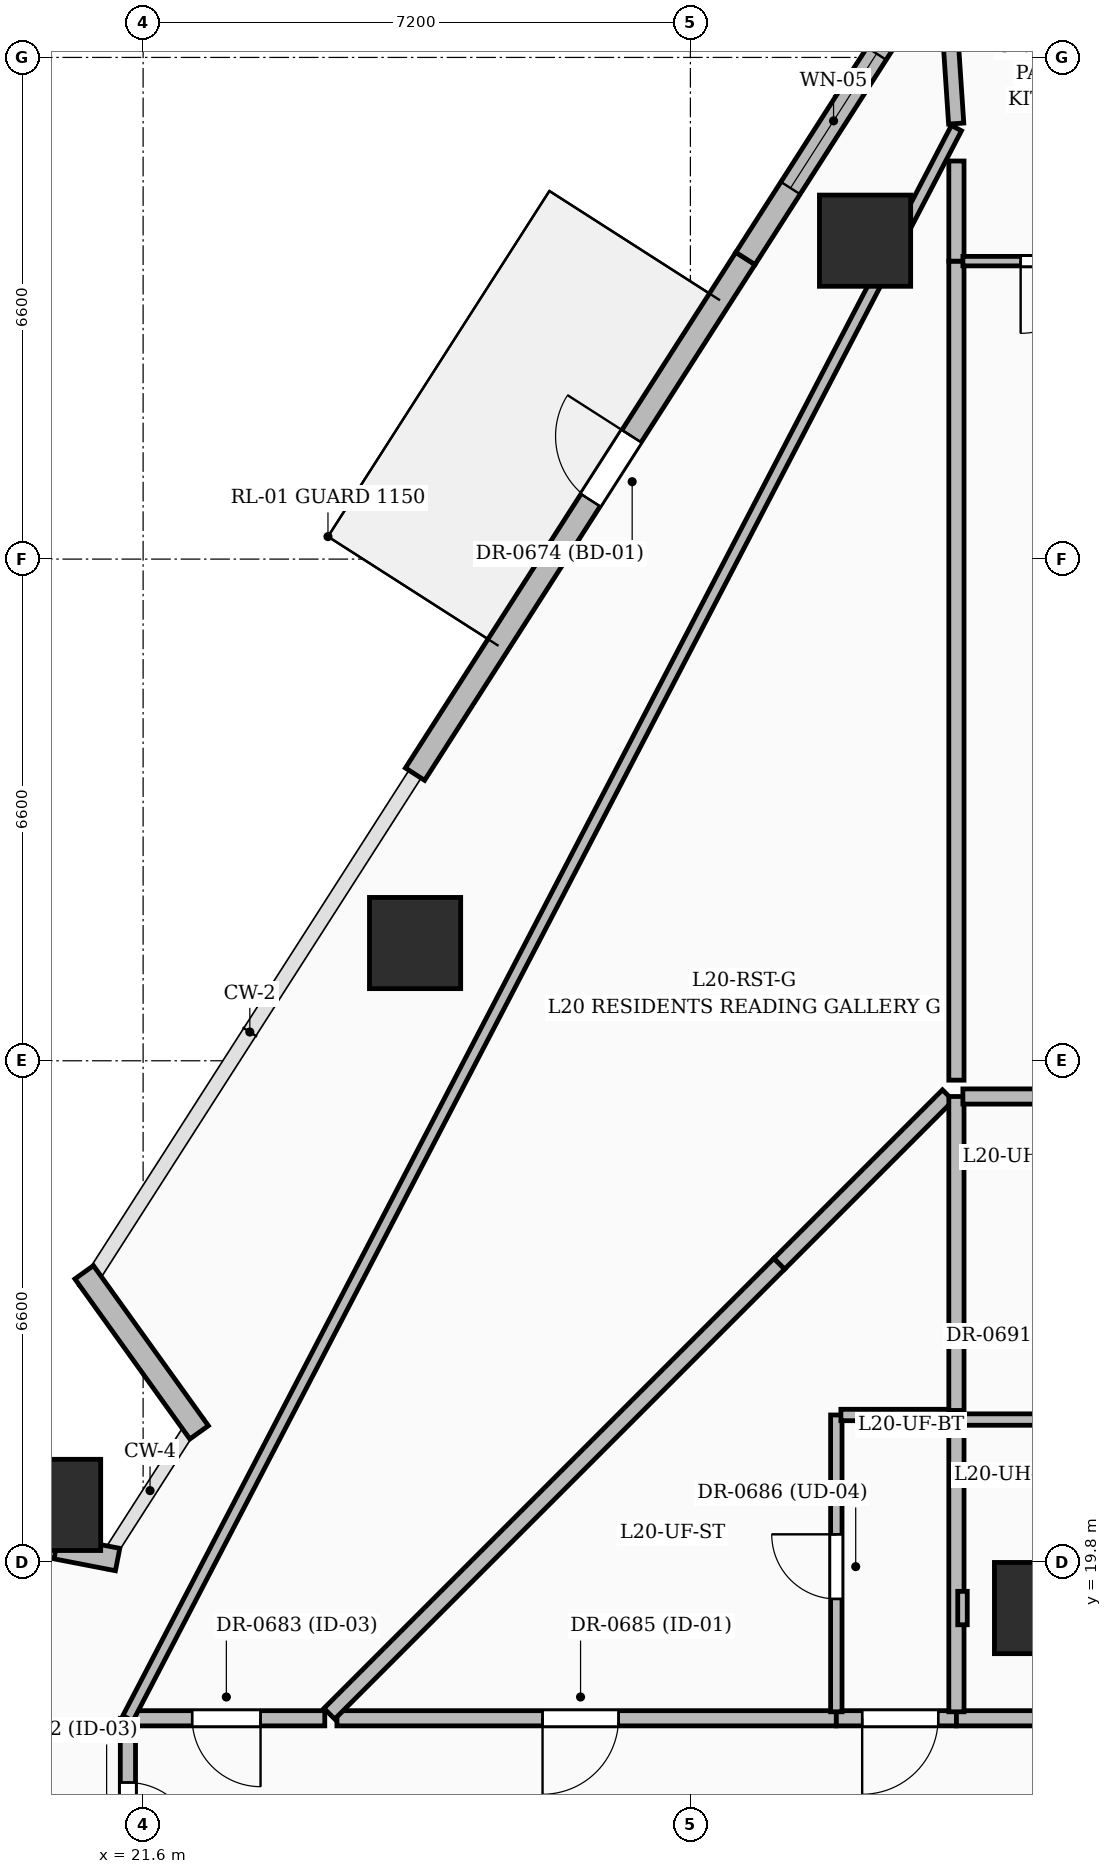
"""IFC4 building model, lengths in metres.
Left out: names, types, materials, properties, quantities, classifications, styles, units other than length and angle.
Written with IfcOpenShell. Run it as: python <this file> out.ifc"""

import sys

from ifc_helpers import new_model, si_unit, direction, frame, frame_2d, origin, origin_2d, place, context, subcontext, project, spatial, rectangle, extrude, element, fill, save


model = new_model("IFC4")
c1 = context("Model", 3, precision=1e-05, world=origin(), true_north=direction((0.0, 1.0)))
c2 = subcontext(c1, "Body", "Model", "MODEL_VIEW")
j1 = project(units=[si_unit("LENGTHUNIT", "METRE"), si_unit("PLANEANGLEUNIT", "RADIAN")], contexts=[c1])
p1 = place(None, origin())
s1 = spatial("IfcSite", under=j1, at=p1, CompositionType="ELEMENT")
p2 = place(p1, origin())
s2 = spatial("IfcBuilding", under=s1, at=p2, CompositionType="ELEMENT")
p3 = place(p2, frame((0.0, 0.0, 82.2)))
s3 = spatial("IfcBuildingStorey", under=s2, at=p3, CompositionType="ELEMENT", Elevation=82.2)
for number, where, z_axis, x_axis in (
    (1, (33.4, 19.2, 0.0), (0.0, 0.0, 1.0), (1.0, 0.0, 0.0)),
    (2, (31.098, 37.189, 0.0), (0.0, 0.0, 1.0), (1.0, 0.0, 0.0)),
    (3, (25.178, 27.949, 0.0), (0.0, 0.0, 1.0), (1.0, 0.0, 0.0)),
    (4, (20.442, 20.557, 0.0), (0.0, 0.0, 1.0), (1.0, 0.0, 0.0)),
):
    element("IfcColumn", number, at=place(p3, frame(where, z_axis=z_axis, x_axis=x_axis)), inside=s3, PredefinedType="COLUMN", context=c2, shape_type="SweptSolid", body=[
        extrude(rectangle(XDim=1.2, YDim=1.2, at=origin_2d()), origin(), (0.0, 0.0, 1.0), 3.6),
    ])
p4 = place(p3, frame((20.456, 19.995, 0.0), z_axis=(0.0, 0.0, 1.0), x_axis=(0.981715557517, -0.190353786749, 0.0)))
e5 = element("IfcWall", 5, at=p4, inside=s3, PredefinedType="SOLIDWALL", context=c2, shape_type="SweptSolid", body=[
    extrude(rectangle(XDim=0.823, YDim=0.3, at=frame_2d((0.412, 0.0))), origin(), (0.0, 0.0, 1.0), 2.35),
])
p5 = place(p3, frame((22.337, 21.511, 0.0), z_axis=(0.0, 0.0, 1.0), x_axis=(-0.583178108206, 0.812344319922, 0.0)))
e6 = element("IfcWall", 6, at=p5, inside=s3, PredefinedType="SOLIDWALL", context=c2, shape_type="SweptSolid", body=[
    extrude(rectangle(XDim=2.593, YDim=0.3, at=frame_2d((1.296, 0.0))), origin(), (0.0, 0.0, 1.0), 2.375),
])
p6 = place(p3, frame((25.177, 30.171, 0.0), z_axis=(0.0, 0.0, 1.0), x_axis=(0.539427662029, 0.842031945616, 0.0)))
e7 = element("IfcWall", 7, at=p6, inside=s3, PredefinedType="SOLIDWALL", context=c2, shape_type="SweptSolid", body=[
    extrude(rectangle(XDim=8.057, YDim=0.3, at=frame_2d((4.029, 0.0))), origin(), (0.0, 0.0, 1.0), 3.35),
])
p7 = place(p6, frame((4.281, 0.0, 0.0)))
e8 = element("IfcOpeningElement", 8, at=p7, cuts=e7, PredefinedType="OPENING", context=c2, shape_type="SweptSolid", body=[
    extrude(rectangle(XDim=1.0, YDim=2.2, at=frame_2d((0.5, 1.1))), frame((0.0, 0.16, 0.0), z_axis=(0.0, -1.0, 0.0), x_axis=(1.0, 0.0, 0.0)), (0.0, 0.0, 1.0), 0.32),
])
p8 = place(p3, frame((29.524, 36.955, 0.0), z_axis=(0.0, 0.0, 1.0), x_axis=(0.539470626143, 0.842004420136, 0.0)))
e9 = element("IfcWall", 9, at=p8, inside=s3, PredefinedType="SOLIDWALL", context=c2, shape_type="SweptSolid", body=[
    extrude(rectangle(XDim=8.058, YDim=0.3, at=frame_2d((4.029, 0.0))), origin(), (0.0, 0.0, 1.0), 3.35),
])
p9 = place(p8, frame((1.1, 0.0, 0.55)))
e10 = element("IfcOpeningElement", 10, at=p9, cuts=e9, PredefinedType="OPENING", context=c2, shape_type="SweptSolid", body=[
    extrude(rectangle(XDim=2.1, YDim=2.4, at=frame_2d((1.05, 1.2))), frame((0.0, 0.16, 0.0), z_axis=(0.0, -1.0, 0.0), x_axis=(1.0, 0.0, 0.0)), (0.0, 0.0, 1.0), 0.32),
])
p10 = place(p3, frame((21.4, 17.75, 0.0), z_axis=(0.0, 0.0, 1.0), x_axis=(0.0, -1.0, 0.0)))
e11 = element("IfcWall", 11, at=p10, inside=s3, PredefinedType="PARTITIONING", context=c2, shape_type="SweptSolid", body=[
    extrude(rectangle(XDim=2.59, YDim=0.2, at=frame_2d((1.295, 0.0))), origin(), (0.0, 0.0, 1.0), 2.709),
])
p11 = place(p10, frame((0.845, 0.0, 0.0)))
e12 = element("IfcOpeningElement", 12, at=p11, cuts=e11, PredefinedType="OPENING", context=c2, shape_type="SweptSolid", body=[
    extrude(rectangle(XDim=0.9, YDim=2.1, at=frame_2d((0.45, 1.05))), frame((0.0, 0.11, 0.0), z_axis=(0.0, -1.0, 0.0), x_axis=(1.0, 0.0, 0.0)), (0.0, 0.0, 1.0), 0.22),
])
p12 = place(p3, frame((30.72, 17.75, 0.0), z_axis=(0.0, 0.0, 1.0), x_axis=(-1.0, 0.0, 0.0)))
e13 = element("IfcWall", 13, at=p12, inside=s3, PredefinedType="PARTITIONING", context=c2, shape_type="SweptSolid", body=[
    extrude(rectangle(XDim=6.57, YDim=0.2, at=frame_2d((3.285, 0.0))), origin(), (0.0, 0.0, 1.0), 2.345),
])
p13 = place(p12, frame((2.865, 0.0, 0.0)))
e14 = element("IfcOpeningElement", 14, at=p13, cuts=e13, PredefinedType="OPENING", context=c2, shape_type="SweptSolid", body=[
    extrude(rectangle(XDim=1.0, YDim=2.2, at=frame_2d((0.5, 1.1))), frame((0.0, 0.11, 0.0), z_axis=(0.0, -1.0, 0.0), x_axis=(1.0, 0.0, 0.0)), (0.0, 0.0, 1.0), 0.22),
])
p14 = place(p3, frame((32.3, 17.75, 0.0), z_axis=(0.0, 0.0, 1.0), x_axis=(-1.0, 0.0, 0.0)))
e15 = element("IfcWall", 15, at=p14, inside=s3, PredefinedType="PARTITIONING", context=c2, shape_type="SweptSolid", body=[
    extrude(rectangle(XDim=1.58, YDim=0.2, at=frame_2d((0.79, 0.0))), origin(), (0.0, 0.0, 1.0), 3.35),
])
p15 = place(p14, frame((0.24, 0.0, 0.0)))
e16 = element("IfcOpeningElement", 16, at=p15, cuts=e15, PredefinedType="OPENING", context=c2, shape_type="SweptSolid", body=[
    extrude(rectangle(XDim=1.0, YDim=2.2, at=frame_2d((0.5, 1.1))), frame((0.0, 0.11, 0.0), z_axis=(0.0, -1.0, 0.0), x_axis=(1.0, 0.0, 0.0)), (0.0, 0.0, 1.0), 0.22),
])
p16 = place(p3, frame((23.99, 17.75, 0.0), z_axis=(0.0, 0.0, 1.0), x_axis=(-1.0, 0.0, 0.0)))
e17 = element("IfcWall", 17, at=p16, inside=s3, PredefinedType="PARTITIONING", context=c2, shape_type="SweptSolid", body=[
    extrude(rectangle(XDim=2.505, YDim=0.2, at=frame_2d((1.252, 0.0))), origin(), (0.0, 0.0, 1.0), 2.345),
])
p17 = place(p16, frame((0.845, 0.0, 0.0)))
e18 = element("IfcOpeningElement", 18, at=p17, cuts=e17, PredefinedType="OPENING", context=c2, shape_type="SweptSolid", body=[
    extrude(rectangle(XDim=0.9, YDim=2.1, at=frame_2d((0.45, 1.05))), frame((0.0, 0.11, 0.0), z_axis=(0.0, -1.0, 0.0), x_axis=(1.0, 0.0, 0.0)), (0.0, 0.0, 1.0), 0.22),
])
p18 = place(p3, frame((34.87, 17.75, 0.0), z_axis=(0.0, 0.0, 1.0), x_axis=(-1.0, 0.0, 0.0)))
e19 = element("IfcWall", 19, at=p18, inside=s3, PredefinedType="PARTITIONING", context=c2, shape_type="SweptSolid", body=[
    extrude(rectangle(XDim=2.57, YDim=0.2, at=frame_2d((1.285, 0.0))), origin(), (0.0, 0.0, 1.0), 2.309),
])
p19 = place(p3, frame((21.4, 17.75, 0.0), z_axis=(0.0, 0.0, 1.0), x_axis=(0.46207959711, 0.886838455376, 0.0)))
e20 = element("IfcWall", 20, at=p19, inside=s3, PredefinedType="PARTITIONING", context=c2, shape_type="SweptSolid", body=[
    extrude(rectangle(XDim=23.589, YDim=0.15, at=frame_2d((11.795, 0.0))), origin(), (0.0, 0.0, 1.0), 2.345),
])
p20 = place(p3, frame((32.297, 38.73, 0.0), z_axis=(0.0, 0.0, 1.0), x_axis=(-0.066629370629, 0.997777794386, 0.0)))
e21 = element("IfcWall", 21, at=p20, inside=s3, PredefinedType="PARTITIONING", context=c2, shape_type="SweptSolid", body=[
    extrude(rectangle(XDim=2.056, YDim=0.2, at=frame_2d((1.028, 0.0))), origin(), (0.0, 0.0, 1.0), 3.35),
])
p21 = place(p3, frame((30.72, 17.835, 0.0), z_axis=(0.0, 0.0, 1.0), x_axis=(0.0, 1.0, 0.0)))
e22 = element("IfcWall", 22, at=p21, inside=s3, PredefinedType="PARTITIONING", context=c2, shape_type="SweptSolid", body=[
    extrude(rectangle(XDim=3.905, YDim=0.15, at=frame_2d((1.953, 0.0))), origin(), (0.0, 0.0, 1.0), 2.345),
])
p22 = place(p21, frame((1.485, 0.0, 0.0)))
e23 = element("IfcOpeningElement", 23, at=p22, cuts=e22, PredefinedType="OPENING", context=c2, shape_type="SweptSolid", body=[
    extrude(rectangle(XDim=0.85, YDim=2.1, at=frame_2d((0.425, 1.05))), frame((0.0, 0.085, 0.0), z_axis=(0.0, -1.0, 0.0), x_axis=(1.0, 0.0, 0.0)), (0.0, 0.0, 1.0), 0.17),
])
p23 = place(p3, frame((29.97, 23.73, 0.0), z_axis=(0.0, 0.0, 1.0), x_axis=(-0.707106781187, -0.707106781187, 0.0)))
e24 = element("IfcWall", 24, at=p23, inside=s3, PredefinedType="PARTITIONING", context=c2, shape_type="SweptSolid", body=[
    extrude(rectangle(XDim=8.372, YDim=0.2, at=frame_2d((4.186, 0.0))), origin(), (0.0, 0.0, 1.0), 2.345),
])
p24 = place(p3, frame((30.78, 21.74, 0.0), z_axis=(0.0, 0.0, 1.0), x_axis=(1.0, 0.0, 0.0)))
e25 = element("IfcWall", 25, at=p24, inside=s3, PredefinedType="PARTITIONING", context=c2, shape_type="SweptSolid", body=[
    extrude(rectangle(XDim=1.52, YDim=0.15, at=frame_2d((0.76, 0.0))), origin(), (0.0, 0.0, 1.0), 2.345),
])
p25 = place(p3, frame((32.187, 25.947, 0.0), z_axis=(0.0, 0.0, 1.0), x_axis=(-0.707106781187, -0.707106781187, 0.0)))
e26 = element("IfcWall", 26, at=p25, inside=s3, PredefinedType="PARTITIONING", context=c2, shape_type="SweptSolid", body=[
    extrude(rectangle(XDim=3.135, YDim=0.2, at=frame_2d((1.568, 0.0))), origin(), (0.0, 0.0, 1.0), 3.35),
])
p26 = place(p3, frame((32.3, 21.8, 0.0), z_axis=(0.0, 0.0, 1.0), x_axis=(0.0, 1.0, 0.0)))
e27 = element("IfcWall", 27, at=p26, inside=s3, PredefinedType="PARTITIONING", context=c2, shape_type="SweptSolid", body=[
    extrude(rectangle(XDim=4.13, YDim=0.2, at=frame_2d((2.065, 0.0))), origin(), (0.0, 0.0, 1.0), 2.709),
])
p27 = place(p3, frame((32.3, 17.835, 0.0), z_axis=(0.0, 0.0, 1.0), x_axis=(0.0, 1.0, 0.0)))
e28 = element("IfcWall", 28, at=p27, inside=s3, PredefinedType="PARTITIONING", context=c2, shape_type="SweptSolid", body=[
    extrude(rectangle(XDim=3.845, YDim=0.2, at=frame_2d((1.922, 0.0))), origin(), (0.0, 0.0, 1.0), 2.345),
])
p28 = place(p3, frame((32.3, 26.145, 0.0), z_axis=(0.0, 0.0, 1.0), x_axis=(0.0, 1.0, 0.0)))
e29 = element("IfcWall", 29, at=p28, inside=s3, PredefinedType="PARTITIONING", context=c2, shape_type="SweptSolid", body=[
    extrude(rectangle(XDim=10.775, YDim=0.2, at=frame_2d((5.387, 0.0))), origin(), (0.0, 0.0, 1.0), 2.345),
])
p29 = place(p3, frame((32.3, 36.92, 0.0), z_axis=(0.0, 0.0, 1.0), x_axis=(0.0, 1.0, 0.0)))
e30 = element("IfcWall", 30, at=p29, inside=s3, PredefinedType="PARTITIONING", context=c2, shape_type="SweptSolid", body=[
    extrude(rectangle(XDim=1.317, YDim=0.2, at=frame_2d((0.659, 0.0))), origin(), (0.0, 0.0, 1.0), 2.37),
])
p30 = place(p3, frame((34.5, 21.68, 0.0), z_axis=(0.0, 0.0, 1.0), x_axis=(-1.0, 0.0, 0.0)))
e31 = element("IfcWall", 31, at=p30, inside=s3, PredefinedType="PARTITIONING", context=c2, shape_type="SweptSolid", body=[
    extrude(rectangle(XDim=2.115, YDim=0.15, at=frame_2d((1.058, 0.0))), origin(), (0.0, 0.0, 1.0), 3.35),
])
p31 = place(p3, frame((34.44, 25.93, 0.0), z_axis=(0.0, 0.0, 1.0), x_axis=(-1.0, 0.0, 0.0)))
e32 = element("IfcWall", 32, at=p31, inside=s3, PredefinedType="PARTITIONING", context=c2, shape_type="SweptSolid", body=[
    extrude(rectangle(XDim=2.055, YDim=0.2, at=frame_2d((1.027, 0.0))), origin(), (0.0, 0.0, 1.0), 2.709),
])
p32 = place(p3, frame((34.94, 36.92, 0.0), z_axis=(0.0, 0.0, 1.0), x_axis=(-1.0, 0.0, 0.0)))
e33 = element("IfcWall", 33, at=p32, inside=s3, PredefinedType="PARTITIONING", context=c2, shape_type="SweptSolid", body=[
    extrude(rectangle(XDim=2.555, YDim=0.125, at=frame_2d((1.277, 0.0))), origin(), (0.0, 0.0, 1.0), 2.37),
])
p33 = place(p32, frame((0.845, 0.0, 0.0)))
e34 = element("IfcOpeningElement", 34, at=p33, cuts=e33, PredefinedType="OPENING", context=c2, shape_type="SweptSolid", body=[
    extrude(rectangle(XDim=0.95, YDim=2.2, at=frame_2d((0.475, 1.1))), frame((0.0, 0.072, 0.0), z_axis=(0.0, -1.0, 0.0), x_axis=(1.0, 0.0, 0.0)), (0.0, 0.0, 1.0), 0.145),
])
p34 = place(p3, frame((32.38, 18.98, 0.0), z_axis=(0.0, 0.0, 1.0), x_axis=(0.0, 1.0, 0.0)))
e35 = element("IfcWall", 35, at=p34, inside=s3, PredefinedType="PARTITIONING", context=c2, shape_type="SweptSolid", body=[
    extrude(rectangle(XDim=0.44, YDim=0.125, at=frame_2d((0.22, 0.0))), origin(), (0.0, 0.0, 1.0), 3.35),
])
p35 = place(p7, origin())
e36 = element("IfcDoor", 36, at=p35, inside=s3, OperationType="SINGLE_SWING_RIGHT", PredefinedType="DOOR", context=c2, shape_type="SweptSolid", body=[
    extrude(rectangle(XDim=1.0, YDim=2.2, at=frame_2d((0.5, 1.1))), frame((0.0, 0.025, 0.0), z_axis=(0.0, -1.0, 0.0), x_axis=(1.0, 0.0, 0.0)), (0.0, 0.0, 1.0), 0.05),
])
fill(e8, e36)
p36 = place(p9, origin())
e37 = element("IfcWindow", 37, at=p36, inside=s3, PartitioningType="SINGLE_PANEL", PredefinedType="WINDOW", context=c2, shape_type="SweptSolid", body=[
    extrude(rectangle(XDim=2.1, YDim=2.4, at=frame_2d((1.05, 1.2))), frame((0.0, 0.03, 0.0), z_axis=(0.0, -1.0, 0.0), x_axis=(1.0, 0.0, 0.0)), (0.0, 0.0, 1.0), 0.06),
])
fill(e10, e37)
p37 = place(p11, origin())
e38 = element("IfcDoor", 38, at=p37, inside=s3, OperationType="SINGLE_SWING_RIGHT", PredefinedType="DOOR", context=c2, shape_type="SweptSolid", body=[
    extrude(rectangle(XDim=0.9, YDim=2.1, at=frame_2d((0.45, 1.05))), frame((0.0, 0.025, 0.0), z_axis=(0.0, -1.0, 0.0), x_axis=(1.0, 0.0, 0.0)), (0.0, 0.0, 1.0), 0.05),
])
fill(e12, e38)
p38 = place(p17, origin())
e39 = element("IfcDoor", 39, at=p38, inside=s3, OperationType="SINGLE_SWING_LEFT", PredefinedType="DOOR", context=c2, shape_type="SweptSolid", body=[
    extrude(rectangle(XDim=0.9, YDim=2.1, at=frame_2d((0.45, 1.05))), frame((0.0, 0.025, 0.0), z_axis=(0.0, -1.0, 0.0), x_axis=(1.0, 0.0, 0.0)), (0.0, 0.0, 1.0), 0.05),
])
fill(e18, e39)
p39 = place(p13, origin())
e40 = element("IfcDoor", 40, at=p39, inside=s3, OperationType="SINGLE_SWING_RIGHT", PredefinedType="DOOR", context=c2, shape_type="SweptSolid", body=[
    extrude(rectangle(XDim=1.0, YDim=2.2, at=frame_2d((0.5, 1.1))), frame((0.0, 0.025, 0.0), z_axis=(0.0, -1.0, 0.0), x_axis=(1.0, 0.0, 0.0)), (0.0, 0.0, 1.0), 0.05),
])
fill(e14, e40)
p40 = place(p22, origin())
e41 = element("IfcDoor", 41, at=p40, inside=s3, OperationType="SINGLE_SWING_RIGHT", PredefinedType="DOOR", context=c2, shape_type="SweptSolid", body=[
    extrude(rectangle(XDim=0.85, YDim=2.1, at=frame_2d((0.425, 1.05))), frame((0.0, 0.025, 0.0), z_axis=(0.0, -1.0, 0.0), x_axis=(1.0, 0.0, 0.0)), (0.0, 0.0, 1.0), 0.05),
])
fill(e23, e41)
p41 = place(p33, origin())
e42 = element("IfcDoor", 42, at=p41, inside=s3, OperationType="SINGLE_SWING_RIGHT", PredefinedType="DOOR", context=c2, shape_type="SweptSolid", body=[
    extrude(rectangle(XDim=0.95, YDim=2.2, at=frame_2d((0.475, 1.1))), frame((0.0, 0.025, 0.0), z_axis=(0.0, -1.0, 0.0), x_axis=(1.0, 0.0, 0.0)), (0.0, 0.0, 1.0), 0.05),
])
fill(e34, e42)
p42 = place(p15, origin())
e43 = element("IfcDoor", 43, at=p42, inside=s3, OperationType="SINGLE_SWING_RIGHT", PredefinedType="DOOR", context=c2, shape_type="SweptSolid", body=[
    extrude(rectangle(XDim=1.0, YDim=2.2, at=frame_2d((0.5, 1.1))), frame((0.0, 0.025, 0.0), z_axis=(0.0, -1.0, 0.0), x_axis=(1.0, 0.0, 0.0)), (0.0, 0.0, 1.0), 0.05),
])
fill(e16, e43)
save(model, sys.argv[1])
